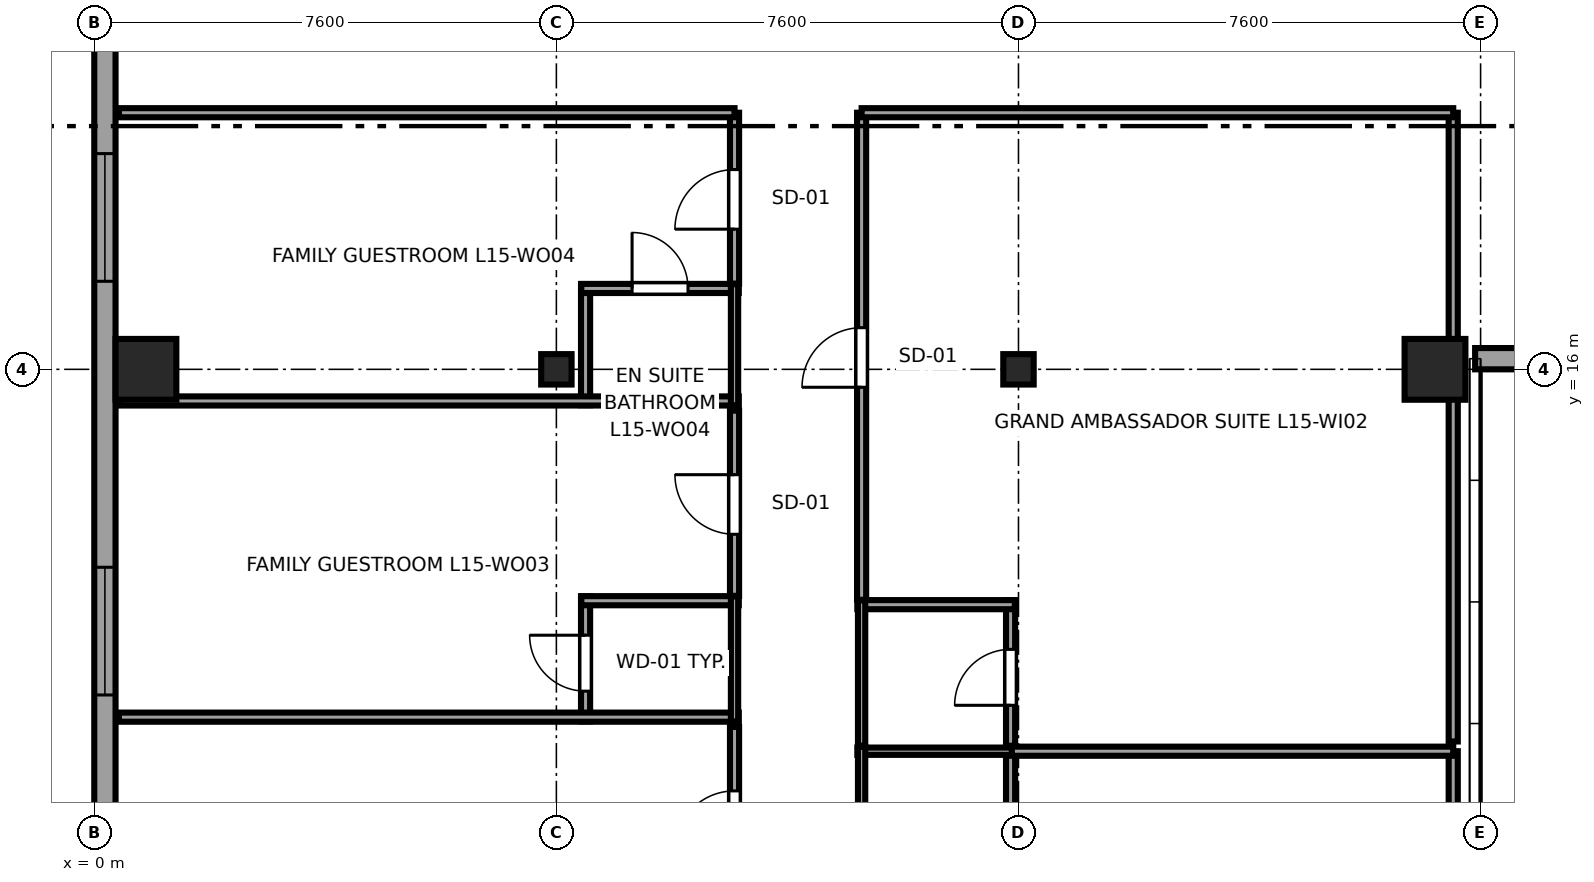
"""IFC4 building model, lengths in metres.
Left out: names, types, materials, properties, quantities, classifications, styles, units other than length and angle.
Written with IfcOpenShell. Run it as: python <this file> out.ifc"""

import sys

from ifc_helpers import new_model, si_unit, direction, frame, frame_2d, origin, origin_2d, place, context, subcontext, project, spatial, rectangle, i_section, extrude, source, transform, mapped, element, fill, save


model = new_model("IFC4")
c1 = context("Model", 3, precision=1e-05, world=origin(), true_north=direction((0.0, 1.0)))
c2 = subcontext(c1, "Body", "Model", "MODEL_VIEW")
j1 = project(units=[si_unit("LENGTHUNIT", "METRE"), si_unit("PLANEANGLEUNIT", "RADIAN")], contexts=[c1])
p1 = place(None, origin())
s1 = spatial("IfcSite", under=j1, at=p1, CompositionType="ELEMENT")
p2 = place(p1, origin())
s2 = spatial("IfcBuilding", under=s1, at=p2, CompositionType="ELEMENT")
p3 = place(p2, frame((0.0, 0.0, 63.95)))
s3 = spatial("IfcBuildingStorey", under=s2, at=p3, CompositionType="ELEMENT", Elevation=63.95)
m1 = source(origin(), c2, "Body", "SweptSolid", [
    extrude(rectangle(XDim=1.0, YDim=1.0, at=origin_2d()), origin(), (0.0, 0.0, 1.0), 3.55),
])
p4 = place(p3, frame((0.85, 16.0, 0.0), z_axis=(0.0, 0.0, 1.0), x_axis=(1.0, 0.0, 0.0)))
e1 = element("IfcColumn", 1, at=p4, inside=s3, PredefinedType="COLUMN", context=c2, shape_type="MappedRepresentation", body=[
    mapped(m1, transform((0.0, 0.0, 0.0), x_axis=(1.0, 0.0, 0.0), y_axis=(0.0, 1.0, 0.0), z_axis=(0.0, 0.0, 1.0), scale=1.0)),
])
m2 = source(origin(), c2, "Body", "SweptSolid", [
    extrude(i_section(OverallWidth=0.5, OverallDepth=0.5, WebThickness=0.028, FlangeThickness=0.045, at=origin_2d()), origin(), (0.0, 0.0, 1.0), 3.55),
])
for number, where, z_axis, x_axis in (
    (2, (7.6, 16.0, 0.0), (0.0, 0.0, 1.0), (1.0, 0.0, 0.0)),
    (3, (15.2, 16.0, 0.0), (0.0, 0.0, 1.0), (1.0, 0.0, 0.0)),
):
    element("IfcColumn", number, at=place(p3, frame(where, z_axis=z_axis, x_axis=x_axis)), inside=s3, PredefinedType="COLUMN", context=c2, shape_type="MappedRepresentation", body=[
        mapped(m2, transform((0.0, 0.0, 0.0), x_axis=(1.0, 0.0, 0.0), y_axis=(0.0, 1.0, 0.0), z_axis=(0.0, 0.0, 1.0), scale=1.0)),
    ])
p5 = place(p3, frame((22.05, 16.0, 0.0), z_axis=(0.0, 0.0, 1.0), x_axis=(1.0, 0.0, 0.0)))
e4 = element("IfcColumn", 4, at=p5, inside=s3, PredefinedType="COLUMN", context=c2, shape_type="MappedRepresentation", body=[
    mapped(m1, transform((0.0, 0.0, 0.0), x_axis=(1.0, 0.0, 0.0), y_axis=(0.0, 1.0, 0.0), z_axis=(0.0, 0.0, 1.0), scale=1.0)),
])
p6 = place(p3, frame((22.71, 16.175, 0.0), z_axis=(0.0, 0.0, 1.0), x_axis=(1.0, 0.0, 0.0)))
e5 = element("IfcWall", 5, at=p6, inside=s3, PredefinedType="SOLIDWALL", context=c2, shape_type="SweptSolid", body=[
    extrude(rectangle(XDim=11.58, YDim=0.35, at=frame_2d((5.79, 0.0))), origin(), (0.0, 0.0, 1.0), 2.748),
])
p7 = place(p6, frame((2.145, 0.0, 0.68)))
e6 = element("IfcOpeningElement", 6, at=p7, cuts=e5, PredefinedType="OPENING", context=c2, shape_type="SweptSolid", body=[
    extrude(rectangle(XDim=2.1, YDim=1.9, at=frame_2d((1.05, 0.95))), frame((0.0, 0.185, 0.0), z_axis=(0.0, -1.0, 0.0), x_axis=(1.0, 0.0, 0.0)), (0.0, 0.0, 1.0), 0.37),
])
p8 = place(p6, frame((7.335, 0.0, 0.68)))
e7 = element("IfcOpeningElement", 7, at=p8, cuts=e5, PredefinedType="OPENING", context=c2, shape_type="SweptSolid", body=[
    extrude(rectangle(XDim=2.1, YDim=1.9, at=frame_2d((1.05, 0.95))), frame((0.0, 0.185, 0.0), z_axis=(0.0, -1.0, 0.0), x_axis=(1.0, 0.0, 0.0)), (0.0, 0.0, 1.0), 0.37),
])
p9 = place(p3, frame((0.175, 41.383, 0.0), z_axis=(0.0, 0.0, 1.0), x_axis=(0.0, -1.0, 0.0)))
e8 = element("IfcWall", 8, at=p9, inside=s3, PredefinedType="SOLIDWALL", context=c2, shape_type="SweptSolid", body=[
    extrude(rectangle(XDim=36.766, YDim=0.35, at=frame_2d((18.383, 0.0))), origin(), (0.0, 0.0, 1.0), 3.37),
])
p10 = place(p9, frame((1.526, 0.0, 0.68)))
e9 = element("IfcOpeningElement", 9, at=p10, cuts=e8, PredefinedType="OPENING", context=c2, shape_type="SweptSolid", body=[
    extrude(rectangle(XDim=2.1, YDim=1.9, at=frame_2d((1.05, 0.95))), frame((0.0, 0.185, 0.0), z_axis=(0.0, -1.0, 0.0), x_axis=(1.0, 0.0, 0.0)), (0.0, 0.0, 1.0), 0.37),
])
p11 = place(p9, frame((4.428, 0.0, 0.68)))
e10 = element("IfcOpeningElement", 10, at=p11, cuts=e8, PredefinedType="OPENING", context=c2, shape_type="SweptSolid", body=[
    extrude(rectangle(XDim=2.1, YDim=1.9, at=frame_2d((1.05, 0.95))), frame((0.0, 0.185, 0.0), z_axis=(0.0, -1.0, 0.0), x_axis=(1.0, 0.0, 0.0)), (0.0, 0.0, 1.0), 0.37),
])
p12 = place(p9, frame((21.835, 0.0, 0.68)))
e11 = element("IfcOpeningElement", 11, at=p12, cuts=e8, PredefinedType="OPENING", context=c2, shape_type="SweptSolid", body=[
    extrude(rectangle(XDim=2.1, YDim=1.9, at=frame_2d((1.05, 0.95))), frame((0.0, 0.185, 0.0), z_axis=(0.0, -1.0, 0.0), x_axis=(1.0, 0.0, 0.0)), (0.0, 0.0, 1.0), 0.37),
])
p13 = place(p9, frame((28.638, 0.0, 0.68)))
e12 = element("IfcOpeningElement", 12, at=p13, cuts=e8, PredefinedType="OPENING", context=c2, shape_type="SweptSolid", body=[
    extrude(rectangle(XDim=2.1, YDim=1.9, at=frame_2d((1.05, 0.95))), frame((0.0, 0.185, 0.0), z_axis=(0.0, -1.0, 0.0), x_axis=(1.0, 0.0, 0.0)), (0.0, 0.0, 1.0), 0.37),
])
p14 = place(p9, frame((33.893, 0.0, 0.62)))
e13 = element("IfcOpeningElement", 13, at=p14, cuts=e8, PredefinedType="OPENING", context=c2, shape_type="SweptSolid", body=[
    extrude(rectangle(XDim=1.5, YDim=1.55, at=frame_2d((0.75, 0.775))), frame((0.0, 0.185, 0.0), z_axis=(0.0, -1.0, 0.0), x_axis=(1.0, 0.0, 0.0)), (0.0, 0.0, 1.0), 0.37),
])
p15 = place(p9, frame((14.643, 0.0, 0.62)))
e14 = element("IfcOpeningElement", 14, at=p15, cuts=e8, PredefinedType="OPENING", context=c2, shape_type="SweptSolid", body=[
    extrude(rectangle(XDim=1.5, YDim=1.55, at=frame_2d((0.75, 0.775))), frame((0.0, 0.185, 0.0), z_axis=(0.0, -1.0, 0.0), x_axis=(1.0, 0.0, 0.0)), (0.0, 0.0, 1.0), 0.37),
])
p16 = place(p3, frame((8.08, 10.21, 0.0), z_axis=(0.0, 0.0, 1.0), x_axis=(0.0, 1.0, 0.0)))
e15 = element("IfcWall", 15, at=p16, inside=s3, PredefinedType="PARTITIONING", context=c2, shape_type="SweptSolid", body=[
    extrude(rectangle(XDim=2.055, YDim=0.15, at=frame_2d((1.027, 0.0))), origin(), (0.0, 0.0, 1.0), 3.37),
])
p17 = place(p16, frame((0.498, 0.0, 0.0)))
e16 = element("IfcOpeningElement", 16, at=p17, cuts=e15, PredefinedType="OPENING", context=c2, shape_type="SweptSolid", body=[
    extrude(rectangle(XDim=0.92, YDim=2.01, at=frame_2d((0.46, 1.005))), frame((0.0, 0.085, 0.0), z_axis=(0.0, -1.0, 0.0), x_axis=(1.0, 0.0, 0.0)), (0.0, 0.0, 1.0), 0.17),
])
p18 = place(p3, frame((0.405, 10.28, 0.0), z_axis=(0.0, 0.0, 1.0), x_axis=(1.0, 0.0, 0.0)))
e17 = element("IfcWall", 17, at=p18, inside=s3, PredefinedType="PARTITIONING", context=c2, shape_type="SweptSolid", body=[
    extrude(rectangle(XDim=10.195, YDim=0.15, at=frame_2d((5.098, 0.0))), origin(), (0.0, 0.0, 1.0), 3.37),
])
p19 = place(p3, frame((8.01, 12.195, 0.0), z_axis=(0.0, 0.0, 1.0), x_axis=(1.0, 0.0, 0.0)))
e18 = element("IfcWall", 18, at=p19, inside=s3, PredefinedType="PARTITIONING", context=c2, shape_type="SweptSolid", body=[
    extrude(rectangle(XDim=2.59, YDim=0.15, at=frame_2d((1.295, 0.0))), origin(), (0.0, 0.0, 1.0), 3.37),
])
p20 = place(p3, frame((10.53, 10.21, 0.0), z_axis=(0.0, 0.0, 1.0), x_axis=(0.0, 1.0, 0.0)))
e19 = element("IfcWall", 19, at=p20, inside=s3, PredefinedType="PLUMBINGWALL", context=c2, shape_type="SweptSolid", body=[
    extrude(rectangle(XDim=2.055, YDim=0.12, at=frame_2d((1.027, 0.0))), origin(), (0.0, 0.0, 1.0), 3.37),
])
p21 = place(p3, frame((8.08, 15.41, 0.0), z_axis=(0.0, 0.0, 1.0), x_axis=(0.0, 1.0, 0.0)))
e20 = element("IfcWall", 20, at=p21, inside=s3, PredefinedType="PARTITIONING", context=c2, shape_type="SweptSolid", body=[
    extrude(rectangle(XDim=1.99, YDim=0.15, at=frame_2d((0.995, 0.0))), origin(), (0.0, 0.0, 1.0), 3.37),
])
p22 = place(p3, frame((0.405, 15.48, 0.0), z_axis=(0.0, 0.0, 1.0), x_axis=(1.0, 0.0, 0.0)))
e21 = element("IfcWall", 21, at=p22, inside=s3, PredefinedType="PARTITIONING", context=c2, shape_type="SweptSolid", body=[
    extrude(rectangle(XDim=10.195, YDim=0.15, at=frame_2d((5.098, 0.0))), origin(), (0.0, 0.0, 1.0), 3.37),
])
p23 = place(p3, frame((8.01, 17.33, 0.0), z_axis=(0.0, 0.0, 1.0), x_axis=(1.0, 0.0, 0.0)))
e22 = element("IfcWall", 22, at=p23, inside=s3, PredefinedType="PARTITIONING", context=c2, shape_type="SweptSolid", body=[
    extrude(rectangle(XDim=2.59, YDim=0.15, at=frame_2d((1.295, 0.0))), origin(), (0.0, 0.0, 1.0), 3.37),
])
p24 = place(p23, frame((0.835, 0.0, 0.0)))
e23 = element("IfcOpeningElement", 23, at=p24, cuts=e22, PredefinedType="OPENING", context=c2, shape_type="SweptSolid", body=[
    extrude(rectangle(XDim=0.92, YDim=2.01, at=frame_2d((0.46, 1.005))), frame((0.0, 0.085, 0.0), z_axis=(0.0, -1.0, 0.0), x_axis=(1.0, 0.0, 0.0)), (0.0, 0.0, 1.0), 0.17),
])
p25 = place(p3, frame((10.53, 15.41, 0.0), z_axis=(0.0, 0.0, 1.0), x_axis=(0.0, 1.0, 0.0)))
e24 = element("IfcWall", 24, at=p25, inside=s3, PredefinedType="PLUMBINGWALL", context=c2, shape_type="SweptSolid", body=[
    extrude(rectangle(XDim=1.99, YDim=0.12, at=frame_2d((0.995, 0.0))), origin(), (0.0, 0.0, 1.0), 3.37),
])
p26 = place(p3, frame((15.07, 7.4, 0.0), z_axis=(0.0, 0.0, 1.0), x_axis=(0.0, 1.0, 0.0)))
e25 = element("IfcWall", 25, at=p26, inside=s3, PredefinedType="PARTITIONING", context=c2, shape_type="SweptSolid", body=[
    extrude(rectangle(XDim=2.39, YDim=0.15, at=frame_2d((1.195, 0.0))), origin(), (0.0, 0.0, 1.0), 2.827),
])
p27 = place(p3, frame((12.55, 9.72, 0.0), z_axis=(0.0, 0.0, 1.0), x_axis=(1.0, 0.0, 0.0)))
e26 = element("IfcWall", 26, at=p27, inside=s3, PredefinedType="PLUMBINGWALL", context=c2, shape_type="SweptSolid", body=[
    extrude(rectangle(XDim=2.59, YDim=0.12, at=frame_2d((1.295, 0.0))), origin(), (0.0, 0.0, 1.0), 3.37),
])
p28 = place(p3, frame((12.62, 7.4, 0.0), z_axis=(0.0, 0.0, 1.0), x_axis=(0.0, 1.0, 0.0)))
e27 = element("IfcWall", 27, at=p28, inside=s3, PredefinedType="PLUMBINGWALL", context=c2, shape_type="SweptSolid", body=[
    extrude(rectangle(XDim=2.39, YDim=0.12, at=frame_2d((1.195, 0.0))), origin(), (0.0, 0.0, 1.0), 3.37),
])
p29 = place(p3, frame((15.07, 9.81, 0.0), z_axis=(0.0, 0.0, 1.0), x_axis=(0.0, 1.0, 0.0)))
e28 = element("IfcWall", 28, at=p29, inside=s3, PredefinedType="PARTITIONING", context=c2, shape_type="SweptSolid", body=[
    extrude(rectangle(XDim=2.39, YDim=0.15, at=frame_2d((1.195, 0.0))), origin(), (0.0, 0.0, 1.0), 2.827),
])
p30 = place(p29, frame((0.665, 0.0, 0.0)))
e29 = element("IfcOpeningElement", 29, at=p30, cuts=e28, PredefinedType="OPENING", context=c2, shape_type="SweptSolid", body=[
    extrude(rectangle(XDim=0.92, YDim=2.01, at=frame_2d((0.46, 1.005))), frame((0.0, 0.085, 0.0), z_axis=(0.0, -1.0, 0.0), x_axis=(1.0, 0.0, 0.0)), (0.0, 0.0, 1.0), 0.17),
])
p31 = place(p3, frame((12.55, 12.13, 0.0), z_axis=(0.0, 0.0, 1.0), x_axis=(1.0, 0.0, 0.0)))
e30 = element("IfcWall", 30, at=p31, inside=s3, PredefinedType="PARTITIONING", context=c2, shape_type="SweptSolid", body=[
    extrude(rectangle(XDim=2.59, YDim=0.15, at=frame_2d((1.295, 0.0))), origin(), (0.0, 0.0, 1.0), 3.37),
])
p32 = place(p3, frame((12.62, 9.81, 0.0), z_axis=(0.0, 0.0, 1.0), x_axis=(0.0, 1.0, 0.0)))
e31 = element("IfcWall", 31, at=p32, inside=s3, PredefinedType="PLUMBINGWALL", context=c2, shape_type="SweptSolid", body=[
    extrude(rectangle(XDim=2.39, YDim=0.12, at=frame_2d((1.195, 0.0))), origin(), (0.0, 0.0, 1.0), 3.37),
])
p33 = place(p3, frame((10.53, 7.075, 0.0), z_axis=(0.0, 0.0, 1.0), x_axis=(0.0, 1.0, 0.0)))
e32 = element("IfcWall", 32, at=p33, inside=s3, PredefinedType="PARTITIONING", context=c2, shape_type="SweptSolid", body=[
    extrude(rectangle(XDim=3.045, YDim=0.15, at=frame_2d((1.522, 0.0))), origin(), (0.0, 0.0, 1.0), 3.37),
])
p34 = place(p33, frame((1.012, 0.0, 0.0)))
e33 = element("IfcOpeningElement", 33, at=p34, cuts=e32, PredefinedType="OPENING", context=c2, shape_type="SweptSolid", body=[
    extrude(rectangle(XDim=0.98, YDim=2.12, at=frame_2d((0.49, 1.06))), frame((0.0, 0.085, 0.0), z_axis=(0.0, -1.0, 0.0), x_axis=(1.0, 0.0, 0.0)), (0.0, 0.0, 1.0), 0.17),
])
p35 = place(p3, frame((10.53, 12.275, 0.0), z_axis=(0.0, 0.0, 1.0), x_axis=(0.0, 1.0, 0.0)))
e34 = element("IfcWall", 34, at=p35, inside=s3, PredefinedType="PARTITIONING", context=c2, shape_type="SweptSolid", body=[
    extrude(rectangle(XDim=3.045, YDim=0.15, at=frame_2d((1.522, 0.0))), origin(), (0.0, 0.0, 1.0), 3.37),
])
p36 = place(p35, frame((1.012, 0.0, 0.0)))
e35 = element("IfcOpeningElement", 35, at=p36, cuts=e34, PredefinedType="OPENING", context=c2, shape_type="SweptSolid", body=[
    extrude(rectangle(XDim=0.98, YDim=2.12, at=frame_2d((0.49, 1.06))), frame((0.0, 0.085, 0.0), z_axis=(0.0, -1.0, 0.0), x_axis=(1.0, 0.0, 0.0)), (0.0, 0.0, 1.0), 0.17),
])
p37 = place(p3, frame((10.53, 17.41, 0.0), z_axis=(0.0, 0.0, 1.0), x_axis=(0.0, 1.0, 0.0)))
e36 = element("IfcWall", 36, at=p37, inside=s3, PredefinedType="PARTITIONING", context=c2, shape_type="SweptSolid", body=[
    extrude(rectangle(XDim=2.81, YDim=0.15, at=frame_2d((1.405, 0.0))), origin(), (0.0, 0.0, 1.0), 3.37),
])
p38 = place(p37, frame((0.895, 0.0, 0.0)))
e37 = element("IfcOpeningElement", 37, at=p38, cuts=e36, PredefinedType="OPENING", context=c2, shape_type="SweptSolid", body=[
    extrude(rectangle(XDim=0.98, YDim=2.12, at=frame_2d((0.49, 1.06))), frame((0.0, 0.085, 0.0), z_axis=(0.0, -1.0, 0.0), x_axis=(1.0, 0.0, 0.0)), (0.0, 0.0, 1.0), 0.17),
])
p39 = place(p3, frame((0.405, 20.22, 0.0), z_axis=(0.0, 0.0, 1.0), x_axis=(1.0, 0.0, 0.0)))
e38 = element("IfcWall", 38, at=p39, inside=s3, PredefinedType="PARTITIONING", context=c2, shape_type="SweptSolid", body=[
    extrude(rectangle(XDim=10.125, YDim=0.15, at=frame_2d((5.062, 0.0))), origin(), (0.0, 0.0, 1.0), 3.37),
])
p40 = place(p3, frame((22.35, 0.405, 0.0), z_axis=(0.0, 0.0, 1.0), x_axis=(0.0, 1.0, 0.0)))
e39 = element("IfcWall", 39, at=p40, inside=s3, PredefinedType="PARTITIONING", context=c2, shape_type="SweptSolid", body=[
    extrude(rectangle(XDim=9.315, YDim=0.15, at=frame_2d((4.657, 0.0))), origin(), (0.0, 0.0, 1.0), 3.37),
])
p41 = place(p3, frame((15.09, 9.72, 0.0), z_axis=(0.0, 0.0, 1.0), x_axis=(1.0, 0.0, 0.0)))
e40 = element("IfcWall", 40, at=p41, inside=s3, PredefinedType="PARTITIONING", context=c2, shape_type="SweptSolid", body=[
    extrude(rectangle(XDim=7.26, YDim=0.15, at=frame_2d((3.63, 0.0))), origin(), (0.0, 0.0, 1.0), 3.37),
])
p42 = place(p3, frame((12.62, 12.21, 0.0), z_axis=(0.0, 0.0, 1.0), x_axis=(0.0, 1.0, 0.0)))
e41 = element("IfcWall", 41, at=p42, inside=s3, PredefinedType="PARTITIONING", context=c2, shape_type="SweptSolid", body=[
    extrude(rectangle(XDim=8.01, YDim=0.15, at=frame_2d((4.005, 0.0))), origin(), (0.0, 0.0, 1.0), 3.37),
])
p43 = place(p42, frame((3.495, 0.0, 0.0)))
e42 = element("IfcOpeningElement", 42, at=p43, cuts=e41, PredefinedType="OPENING", context=c2, shape_type="SweptSolid", body=[
    extrude(rectangle(XDim=0.98, YDim=2.12, at=frame_2d((0.49, 1.06))), frame((0.0, 0.085, 0.0), z_axis=(0.0, -1.0, 0.0), x_axis=(1.0, 0.0, 0.0)), (0.0, 0.0, 1.0), 0.17),
])
p44 = place(p3, frame((22.35, 9.88, 0.0), z_axis=(0.0, 0.0, 1.0), x_axis=(0.0, 1.0, 0.0)))
e43 = element("IfcWall", 43, at=p44, inside=s3, PredefinedType="PARTITIONING", context=c2, shape_type="SweptSolid", body=[
    extrude(rectangle(XDim=10.34, YDim=0.15, at=frame_2d((5.17, 0.0))), origin(), (0.0, 0.0, 1.0), 3.37),
])
p45 = place(p3, frame((12.62, 20.22, 0.0), z_axis=(0.0, 0.0, 1.0), x_axis=(1.0, 0.0, 0.0)))
e44 = element("IfcWall", 44, at=p45, inside=s3, PredefinedType="PARTITIONING", context=c2, shape_type="SweptSolid", body=[
    extrude(rectangle(XDim=9.73, YDim=0.15, at=frame_2d((4.865, 0.0))), origin(), (0.0, 0.0, 1.0), 2.954),
])
m3 = source(origin(), c2, "Body", "SweptSolid", [
    extrude(rectangle(XDim=2.1, YDim=1.9, at=frame_2d((1.05, 0.95))), frame((0.0, 0.09, 0.0), z_axis=(0.0, -1.0, 0.0), x_axis=(1.0, 0.0, 0.0)), (0.0, 0.0, 1.0), 0.06),
])
p46 = place(p12, origin())
e45 = element("IfcWindow", 45, at=p46, inside=s3, PartitioningType="TRIPLE_PANEL_HORIZONTAL", PredefinedType="WINDOW", context=c2, shape_type="MappedRepresentation", body=[
    mapped(m3, transform((0.0, 0.0, 0.0), x_axis=(1.0, 0.0, 0.0), y_axis=(0.0, 1.0, 0.0), z_axis=(0.0, 0.0, 1.0), scale=1.0)),
])
fill(e11, e45)
p47 = place(p13, origin())
e46 = element("IfcWindow", 46, at=p47, inside=s3, PartitioningType="TRIPLE_PANEL_HORIZONTAL", PredefinedType="WINDOW", context=c2, shape_type="MappedRepresentation", body=[
    mapped(m3, transform((0.0, 0.0, 0.0), x_axis=(1.0, 0.0, 0.0), y_axis=(0.0, 1.0, 0.0), z_axis=(0.0, 0.0, 1.0), scale=1.0)),
])
fill(e12, e46)
m4 = source(origin(), c2, "Body", "SweptSolid", [
    extrude(rectangle(XDim=0.92, YDim=2.01, at=frame_2d((0.46, 1.005))), frame((0.0, 0.025, 0.0), z_axis=(0.0, -1.0, 0.0), x_axis=(1.0, 0.0, 0.0)), (0.0, 0.0, 1.0), 0.05),
])
p48 = place(p17, origin())
e47 = element("IfcDoor", 47, at=p48, inside=s3, OperationType="SINGLE_SWING_RIGHT", PredefinedType="DOOR", context=c2, shape_type="MappedRepresentation", body=[
    mapped(m4, transform((0.0, 0.0, 0.0), x_axis=(1.0, 0.0, 0.0), y_axis=(0.0, 1.0, 0.0), z_axis=(0.0, 0.0, 1.0), scale=1.0)),
])
fill(e16, e47)
p49 = place(p24, origin())
e48 = element("IfcDoor", 48, at=p49, inside=s3, OperationType="SINGLE_SWING_LEFT", PredefinedType="DOOR", context=c2, shape_type="MappedRepresentation", body=[
    mapped(m4, transform((0.0, 0.0, 0.0), x_axis=(1.0, 0.0, 0.0), y_axis=(0.0, 1.0, 0.0), z_axis=(0.0, 0.0, 1.0), scale=1.0)),
])
fill(e23, e48)
p50 = place(p30, origin())
e49 = element("IfcDoor", 49, at=p50, inside=s3, OperationType="SINGLE_SWING_LEFT", PredefinedType="DOOR", context=c2, shape_type="MappedRepresentation", body=[
    mapped(m4, transform((0.0, 0.0, 0.0), x_axis=(1.0, 0.0, 0.0), y_axis=(0.0, 1.0, 0.0), z_axis=(0.0, 0.0, 1.0), scale=1.0)),
])
fill(e29, e49)
m5 = source(origin(), c2, "Body", "SweptSolid", [
    extrude(rectangle(XDim=0.98, YDim=2.12, at=frame_2d((0.49, 1.06))), frame((0.0, 0.025, 0.0), z_axis=(0.0, -1.0, 0.0), x_axis=(1.0, 0.0, 0.0)), (0.0, 0.0, 1.0), 0.05),
])
p51 = place(p34, origin())
e50 = element("IfcDoor", 50, at=p51, inside=s3, OperationType="SINGLE_SWING_LEFT", PredefinedType="DOOR", context=c2, shape_type="MappedRepresentation", body=[
    mapped(m5, transform((0.0, 0.0, 0.0), x_axis=(1.0, 0.0, 0.0), y_axis=(0.0, 1.0, 0.0), z_axis=(0.0, 0.0, 1.0), scale=1.0)),
])
fill(e33, e50)
p52 = place(p36, origin())
e51 = element("IfcDoor", 51, at=p52, inside=s3, OperationType="SINGLE_SWING_RIGHT", PredefinedType="DOOR", context=c2, shape_type="MappedRepresentation", body=[
    mapped(m5, transform((0.0, 0.0, 0.0), x_axis=(1.0, 0.0, 0.0), y_axis=(0.0, 1.0, 0.0), z_axis=(0.0, 0.0, 1.0), scale=1.0)),
])
fill(e35, e51)
p53 = place(p38, origin())
e52 = element("IfcDoor", 52, at=p53, inside=s3, OperationType="SINGLE_SWING_LEFT", PredefinedType="DOOR", context=c2, shape_type="MappedRepresentation", body=[
    mapped(m5, transform((0.0, 0.0, 0.0), x_axis=(1.0, 0.0, 0.0), y_axis=(0.0, 1.0, 0.0), z_axis=(0.0, 0.0, 1.0), scale=1.0)),
])
fill(e37, e52)
p54 = place(p43, origin())
e53 = element("IfcDoor", 53, at=p54, inside=s3, OperationType="SINGLE_SWING_LEFT", PredefinedType="DOOR", context=c2, shape_type="MappedRepresentation", body=[
    mapped(m5, transform((0.0, 0.0, 0.0), x_axis=(1.0, 0.0, 0.0), y_axis=(0.0, 1.0, 0.0), z_axis=(0.0, 0.0, 1.0), scale=1.0)),
])
fill(e42, e53)
save(model, sys.argv[1])
